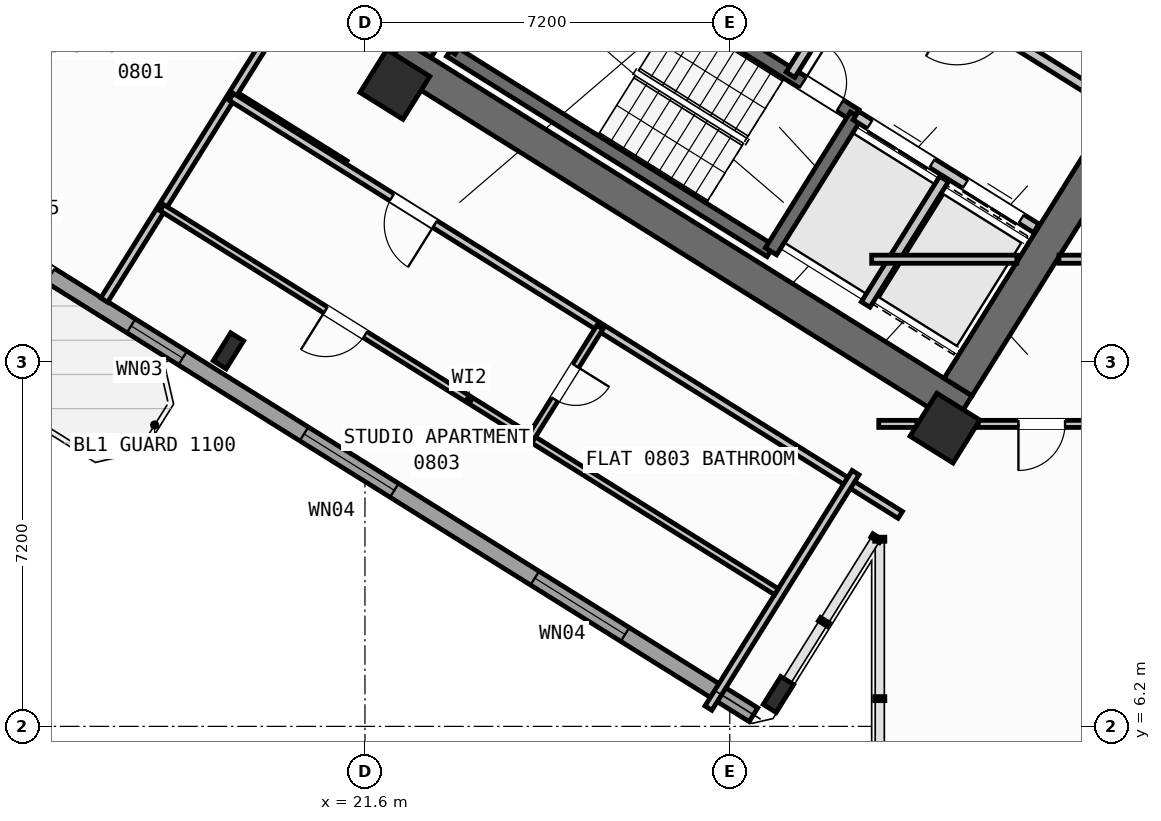
"""IFC4 building model, lengths in metres.
Left out: names, types, materials, properties, quantities, classifications, styles, units other than length and angle.
Written with IfcOpenShell. Run it as: python <this file> out.ifc"""

import sys

from ifc_helpers import new_model, si_unit, direction, frame, frame_2d, origin, origin_2d, place, context, subcontext, project, spatial, rectangle, hollow_rectangle, i_section, extrude, source, transform, mapped, element, fill, save


model = new_model("IFC4")
c1 = context("Model", 3, precision=1e-05, world=origin(), true_north=direction((0.0, 1.0)))
c2 = subcontext(c1, "Body", "Model", "MODEL_VIEW")
j1 = project(units=[si_unit("LENGTHUNIT", "METRE"), si_unit("PLANEANGLEUNIT", "RADIAN")], contexts=[c1])
p1 = place(None, origin())
s1 = spatial("IfcSite", under=j1, at=p1, CompositionType="ELEMENT")
p2 = place(p1, origin())
s2 = spatial("IfcBuilding", under=s1, at=p2, CompositionType="ELEMENT")
p3 = place(p2, frame((0.0, 0.0, 34.8)))
s3 = spatial("IfcBuildingStorey", under=s2, at=p3, CompositionType="ELEMENT", Elevation=34.8)
p4 = place(p3, frame((33.409, 12.45, 0.0), z_axis=(0.0, 0.0, 1.0), x_axis=(-0.848051132073, 0.529914405721, 0.0)))
e1 = element("IfcWall", 1, at=p4, inside=s3, PredefinedType="SHEAR", context=c2, shape_type="SweptSolid", body=[
    extrude(rectangle(XDim=13.24, YDim=0.65, at=frame_2d((6.62, 0.0))), origin(), (0.0, 0.0, 1.0), 3.35),
])
p5 = place(p3, frame((36.683, 18.304, 0.0), z_axis=(0.0, 0.0, 1.0), x_axis=(-0.529899109053, -0.848060690178, 0.0)))
e2 = element("IfcWall", 2, at=p5, inside=s3, PredefinedType="SHEAR", context=c2, shape_type="SweptSolid", body=[
    extrude(rectangle(XDim=6.375, YDim=0.65, at=frame_2d((3.188, 0.0))), origin(), (0.0, 0.0, 1.0), 3.35),
])
p6 = place(p3, frame((26.007, 24.976, 0.0), z_axis=(0.0, 0.0, 1.0), x_axis=(-0.529916319127, -0.848049936456, 0.0)))
e3 = element("IfcWall", 3, at=p6, inside=s3, PredefinedType="SHEAR", context=c2, shape_type="SweptSolid", body=[
    extrude(rectangle(XDim=6.375, YDim=0.65, at=frame_2d((3.188, 0.0))), origin(), (0.0, 0.0, 1.0), 3.35),
])
m1 = source(origin(), c2, "Body", "SweptSolid", [
    extrude(hollow_rectangle(XDim=1.0, YDim=1.0, WallThickness=0.04, at=origin_2d()), origin(), (0.0, 0.0, 1.0), 3.6),
])
p7 = place(p3, frame((33.046, 12.087, 0.0), z_axis=(0.0, 0.0, 1.0), x_axis=(-0.848048096156, 0.529919264233, 0.0)))
e4 = element("IfcColumn", 4, at=p7, inside=s3, PredefinedType="COLUMN", context=c2, shape_type="MappedRepresentation", body=[
    mapped(m1, transform((0.0, 0.0, 0.0), scale=1.0)),
])
m2 = source(origin(), c2, "Body", "SweptSolid", [
    extrude(i_section(OverallWidth=0.3, OverallDepth=0.65, WebThickness=0.016, FlangeThickness=0.031, at=origin_2d()), origin(), (0.0, 0.0, 1.0), 3.6),
])
p8 = place(p3, frame((29.761, 6.829, 0.0), z_axis=(0.0, 0.0, 1.0), x_axis=(-0.848048096156, 0.529919264233, 0.0)))
e5 = element("IfcColumn", 5, at=p8, inside=s3, PredefinedType="COLUMN", context=c2, shape_type="MappedRepresentation", body=[
    mapped(m2, transform((0.0, 0.0, 0.0), scale=1.0)),
])
p9 = place(p3, frame((22.191, 18.87, 0.0), z_axis=(0.0, 0.0, 1.0), x_axis=(-0.848048096156, 0.529919264233, 0.0)))
e6 = element("IfcColumn", 6, at=p9, inside=s3, PredefinedType="COLUMN", context=c2, shape_type="MappedRepresentation", body=[
    mapped(m1, transform((0.0, 0.0, 0.0), scale=1.0)),
])
p10 = place(p3, frame((18.906, 13.612, 0.0), z_axis=(0.0, 0.0, 1.0), x_axis=(-0.848048096156, 0.529919264233, 0.0)))
e7 = element("IfcColumn", 7, at=p10, inside=s3, PredefinedType="COLUMN", context=c2, shape_type="MappedRepresentation", body=[
    mapped(m2, transform((0.0, 0.0, 0.0), scale=1.0)),
])
p11 = place(p3, frame((29.268, 6.429, 0.0), z_axis=(0.0, 0.0, 1.0), x_axis=(-0.848049971435, 0.529916263149, 0.0)))
e8 = element("IfcWall", 8, at=p11, inside=s3, PredefinedType="STANDARD", context=c2, shape_type="SweptSolid", body=[
    extrude(rectangle(XDim=31.588, YDim=0.32, at=frame_2d((15.794, 0.0))), origin(), (0.0, 0.0, 1.0), 3.35),
])
p12 = place(p11, frame((16.362, 0.0, 0.0)))
e9 = element("IfcOpeningElement", 9, at=p12, cuts=e8, PredefinedType="OPENING", context=c2, shape_type="SweptSolid", body=[
    extrude(rectangle(XDim=1.2, YDim=2.15, at=frame_2d((0.6, 1.075))), frame((0.0, 0.17, 0.0), z_axis=(0.0, -1.0, 0.0), x_axis=(1.0, 0.0, 0.0)), (0.0, 0.0, 1.0), 0.34),
])
p13 = place(p11, frame((2.989, 0.0, 0.8)))
e10 = element("IfcOpeningElement", 10, at=p13, cuts=e8, PredefinedType="OPENING", context=c2, shape_type="SweptSolid", body=[
    extrude(rectangle(XDim=2.1, YDim=1.55, at=frame_2d((1.05, 0.775))), frame((0.0, 0.17, 0.0), z_axis=(0.0, -1.0, 0.0), x_axis=(1.0, 0.0, 0.0)), (0.0, 0.0, 1.0), 0.34),
])
p14 = place(p11, frame((8.359, 0.0, 0.8)))
e11 = element("IfcOpeningElement", 11, at=p14, cuts=e8, PredefinedType="OPENING", context=c2, shape_type="SweptSolid", body=[
    extrude(rectangle(XDim=2.1, YDim=1.55, at=frame_2d((1.05, 0.775))), frame((0.0, 0.17, 0.0), z_axis=(0.0, -1.0, 0.0), x_axis=(1.0, 0.0, 0.0)), (0.0, 0.0, 1.0), 0.34),
])
p15 = place(p11, frame((13.284, 0.0, 0.95)))
e12 = element("IfcOpeningElement", 12, at=p15, cuts=e8, PredefinedType="OPENING", context=c2, shape_type="SweptSolid", body=[
    extrude(rectangle(XDim=1.2, YDim=1.4, at=frame_2d((0.6, 0.7))), frame((0.0, 0.17, 0.0), z_axis=(0.0, -1.0, 0.0), x_axis=(1.0, 0.0, 0.0)), (0.0, 0.0, 1.0), 0.34),
])
p16 = place(p11, frame((20.39, 0.0, 0.95)))
e13 = element("IfcOpeningElement", 13, at=p16, cuts=e8, PredefinedType="OPENING", context=c2, shape_type="SweptSolid", body=[
    extrude(rectangle(XDim=1.2, YDim=1.4, at=frame_2d((0.6, 0.7))), frame((0.0, 0.17, 0.0), z_axis=(0.0, -1.0, 0.0), x_axis=(1.0, 0.0, 0.0)), (0.0, 0.0, 1.0), 0.34),
])
p17 = place(p11, frame((23.715, 0.0, 1.0)))
e14 = element("IfcOpeningElement", 14, at=p17, cuts=e8, PredefinedType="OPENING", context=c2, shape_type="SweptSolid", body=[
    extrude(rectangle(XDim=0.9, YDim=1.25, at=frame_2d((0.45, 0.625))), frame((0.0, 0.17, 0.0), z_axis=(0.0, -1.0, 0.0), x_axis=(1.0, 0.0, 0.0)), (0.0, 0.0, 1.0), 0.34),
])
p18 = place(p11, frame((27.481, 0.0, 0.8)))
e15 = element("IfcOpeningElement", 15, at=p18, cuts=e8, PredefinedType="OPENING", context=c2, shape_type="SweptSolid", body=[
    extrude(rectangle(XDim=2.1, YDim=1.55, at=frame_2d((1.05, 0.775))), frame((0.0, 0.17, 0.0), z_axis=(0.0, -1.0, 0.0), x_axis=(1.0, 0.0, 0.0)), (0.0, 0.0, 1.0), 0.34),
])
p19 = place(p3, frame((29.605, 15.581, 0.0), z_axis=(0.0, 0.0, 1.0), x_axis=(-0.848036911448, 0.529937163087, 0.0)))
e16 = element("IfcWall", 16, at=p19, inside=s3, PredefinedType="SHEAR", context=c2, shape_type="SweptSolid", body=[
    extrude(rectangle(XDim=7.46, YDim=0.26, at=frame_2d((3.73, 0.0))), origin(), (0.0, 0.0, 1.0), 3.35),
])
p20 = place(p3, frame((31.28, 18.261, 0.0), z_axis=(0.0, 0.0, 1.0), x_axis=(-0.848051618787, 0.529913626805, 0.0)))
e17 = element("IfcWall", 17, at=p20, inside=s3, PredefinedType="SHEAR", context=c2, shape_type="SweptSolid", body=[
    extrude(rectangle(XDim=7.46, YDim=0.26, at=frame_2d((3.73, 0.0))), origin(), (0.0, 0.0, 1.0), 3.35),
])
p21 = place(p20, frame((0.36, 0.0, 0.0)))
e18 = element("IfcOpeningElement", 18, at=p21, cuts=e17, PredefinedType="OPENING", context=c2, shape_type="SweptSolid", body=[
    extrude(rectangle(XDim=0.86, YDim=2.05, at=frame_2d((0.43, 1.025))), frame((0.0, 0.14, 0.0), z_axis=(0.0, -1.0, 0.0), x_axis=(1.0, 0.0, 0.0)), (0.0, 0.0, 1.0), 0.28),
])
p22 = place(p3, frame((31.288, 18.256, 0.0), z_axis=(0.0, 0.0, 1.0), x_axis=(-0.529943379326, -0.848033026897, 0.0)))
e19 = element("IfcWall", 19, at=p22, inside=s3, PredefinedType="SHEAR", context=c2, shape_type="SweptSolid", body=[
    extrude(rectangle(XDim=3.16, YDim=0.26, at=frame_2d((1.58, 0.0))), origin(), (0.0, 0.0, 1.0), 3.35),
])
p23 = place(p3, frame((24.945, 22.22, 0.0), z_axis=(0.0, 0.0, 1.0), x_axis=(-0.529908658664, -0.84805472316, 0.0)))
e20 = element("IfcWall", 20, at=p23, inside=s3, PredefinedType="SHEAR", context=c2, shape_type="SweptSolid", body=[
    extrude(rectangle(XDim=3.16, YDim=0.26, at=frame_2d((1.58, 0.0))), origin(), (0.0, 0.0, 1.0), 3.35),
])
p24 = place(p3, frame((34.848, 16.031, 0.0), z_axis=(0.0, 0.0, 1.0), x_axis=(-0.848044042236, 0.529925751807, 0.0)))
e21 = element("IfcWall", 21, at=p24, inside=s3, PredefinedType="STANDARD", context=c2, shape_type="SweptSolid", body=[
    extrude(rectangle(XDim=4.198, YDim=0.2, at=frame_2d((2.099, 0.0))), origin(), (0.0, 0.0, 1.0), 3.34),
])
p25 = place(p24, frame((0.348, 0.0, 0.0)))
e22 = element("IfcOpeningElement", 22, at=p25, cuts=e21, PredefinedType="OPENING", context=c2, shape_type="SweptSolid", body=[
    extrude(rectangle(XDim=1.3, YDim=2.2, at=frame_2d((0.65, 1.1))), frame((0.0, 0.11, 0.0), z_axis=(0.0, -1.0, 0.0), x_axis=(1.0, 0.0, 0.0)), (0.0, 0.0, 1.0), 0.22),
])
p26 = place(p24, frame((2.423, 0.0, 0.0)))
e23 = element("IfcOpeningElement", 23, at=p26, cuts=e21, PredefinedType="OPENING", context=c2, shape_type="SweptSolid", body=[
    extrude(rectangle(XDim=1.45, YDim=2.25, at=frame_2d((0.725, 1.125))), frame((0.0, 0.11, 0.0), z_axis=(0.0, -1.0, 0.0), x_axis=(1.0, 0.0, 0.0)), (0.0, 0.0, 1.0), 0.22),
])
p27 = place(p3, frame((36.374, 18.474, 0.0), z_axis=(0.0, 0.0, 1.0), x_axis=(-0.848051071577, 0.529914502535, 0.0)))
e24 = element("IfcWall", 24, at=p27, inside=s3, PredefinedType="STANDARD", context=c2, shape_type="SweptSolid", body=[
    extrude(rectangle(XDim=5.718, YDim=0.2, at=frame_2d((2.859, 0.0))), origin(), (0.0, 0.0, 1.0), 3.34),
])
p28 = place(p27, frame((2.498, 0.0, 0.0)))
e25 = element("IfcOpeningElement", 25, at=p28, cuts=e24, PredefinedType="OPENING", context=c2, shape_type="SweptSolid", body=[
    extrude(rectangle(XDim=1.15, YDim=2.1, at=frame_2d((0.575, 1.05))), frame((0.0, 0.11, 0.0), z_axis=(0.0, -1.0, 0.0), x_axis=(1.0, 0.0, 0.0)), (0.0, 0.0, 1.0), 0.22),
])
p29 = place(p3, frame((33.029, 17.003, 0.0), z_axis=(0.0, 0.0, 1.0), x_axis=(-0.529916267533, -0.848049968695, 0.0)))
e26 = element("IfcWall", 26, at=p29, inside=s3, PredefinedType="STANDARD", context=c2, shape_type="SweptSolid", body=[
    extrude(rectangle(XDim=2.92, YDim=0.2, at=frame_2d((1.46, 0.0))), origin(), (0.0, 0.0, 1.0), 3.34),
])
p30 = place(p3, frame((31.525, 21.504, 0.0), z_axis=(0.0, 0.0, 1.0), x_axis=(-0.529907497854, -0.848055448493, 0.0)))
e27 = element("IfcWall", 27, at=p30, inside=s3, PredefinedType="STANDARD", context=c2, shape_type="SweptSolid", body=[
    extrude(rectangle(XDim=2.88, YDim=0.2, at=frame_2d((1.44, 0.0))), origin(), (0.0, 0.0, 1.0), 3.34),
])
p31 = place(p3, frame((21.206, 17.292, 0.0), z_axis=(0.0, 0.0, 1.0), x_axis=(-0.848050851465, 0.529914854792, 0.0)))
e28 = element("IfcWall", 28, at=p31, inside=s3, PredefinedType="PARTITIONING", context=c2, shape_type="SweptSolid", body=[
    extrude(rectangle(XDim=2.61, YDim=0.16, at=frame_2d((1.305, 0.0))), origin(), (0.0, 0.0, 1.0), 3.34),
])
p32 = place(p3, frame((25.807, 29.582, 0.0), z_axis=(0.0, 0.0, 1.0), x_axis=(-0.529918119251, -0.84804881162, 0.0)))
e29 = element("IfcWall", 29, at=p32, inside=s3, PredefinedType="PARTITIONING", context=c2, shape_type="SweptSolid", body=[
    extrude(rectangle(XDim=17.65, YDim=0.16, at=frame_2d((8.825, 0.0))), origin(), (0.0, 0.0, 1.0), 3.34),
])
p33 = place(p3, frame((16.492, 21.827, 0.0), z_axis=(0.0, 0.0, 1.0), x_axis=(-0.529904608059, -0.848057254175, 0.0)))
e30 = element("IfcWall", 30, at=p33, inside=s3, PredefinedType="PARTITIONING", context=c2, shape_type="SweptSolid", body=[
    extrude(rectangle(XDim=5.351, YDim=0.16, at=frame_2d((2.675, 0.0))), origin(), (0.0, 0.0, 1.0), 2.725),
])
p34 = place(p3, frame((17.861, 31.505, 0.0), z_axis=(0.0, 0.0, 1.0), x_axis=(-0.529928839727, -0.848042112649, 0.0)))
e31 = element("IfcWall", 31, at=p34, inside=s3, PredefinedType="PARTITIONING", context=c2, shape_type="SweptSolid", body=[
    extrude(rectangle(XDim=15.34, YDim=0.11, at=frame_2d((7.67, 0.0))), origin(), (0.0, 0.0, 1.0), 3.34),
])
p35 = place(p34, frame((0.35, 0.0, 0.0)))
e32 = element("IfcOpeningElement", 32, at=p35, cuts=e31, PredefinedType="OPENING", context=c2, shape_type="SweptSolid", body=[
    extrude(rectangle(XDim=0.92, YDim=2.08, at=frame_2d((0.46, 1.04))), frame((0.0, 0.065, 0.0), z_axis=(0.0, -1.0, 0.0), x_axis=(1.0, 0.0, 0.0)), (0.0, 0.0, 1.0), 0.13),
])
p36 = place(p3, frame((32.164, 10.374, 0.0), z_axis=(0.0, 0.0, 1.0), x_axis=(-0.848044107957, 0.529925646633, 0.0)))
e33 = element("IfcWall", 33, at=p36, inside=s3, PredefinedType="PARTITIONING", context=c2, shape_type="SweptSolid", body=[
    extrude(rectangle(XDim=15.57, YDim=0.16, at=frame_2d((7.785, 0.0))), origin(), (0.0, 0.0, 1.0), 3.34),
])
p37 = place(p36, frame((10.83, 0.0, 0.0)))
e34 = element("IfcOpeningElement", 34, at=p37, cuts=e33, PredefinedType="OPENING", context=c2, shape_type="SweptSolid", body=[
    extrude(rectangle(XDim=1.0, YDim=2.1, at=frame_2d((0.5, 1.05))), frame((0.0, 0.09, 0.0), z_axis=(0.0, -1.0, 0.0), x_axis=(1.0, 0.0, 0.0)), (0.0, 0.0, 1.0), 0.18),
])
p38 = place(p3, frame((31.282, 11.208, 0.0), z_axis=(0.0, 0.0, 1.0), x_axis=(-0.529938869374, -0.84803584519, 0.0)))
e35 = element("IfcWall", 35, at=p38, inside=s3, PredefinedType="PARTITIONING", context=c2, shape_type="SweptSolid", body=[
    extrude(rectangle(XDim=5.48, YDim=0.16, at=frame_2d((2.74, 0.0))), origin(), (0.0, 0.0, 1.0), 3.34),
])
p39 = place(p3, frame((29.72, 8.859, 0.0), z_axis=(0.0, 0.0, 1.0), x_axis=(-0.848049134363, 0.529917602752, 0.0)))
e36 = element("IfcWall", 36, at=p39, inside=s3, PredefinedType="PLUMBINGWALL", context=c2, shape_type="SweptSolid", body=[
    extrude(rectangle(XDim=14.3, YDim=0.14, at=frame_2d((7.15, 0.0))), origin(), (0.0, 0.0, 1.0), 3.34),
])
p40 = place(p39, frame((9.57, 0.0, 0.0)))
e37 = element("IfcOpeningElement", 37, at=p40, cuts=e36, PredefinedType="OPENING", context=c2, shape_type="SweptSolid", body=[
    extrude(rectangle(XDim=0.92, YDim=2.08, at=frame_2d((0.46, 1.04))), frame((0.0, 0.08, 0.0), z_axis=(0.0, -1.0, 0.0), x_axis=(1.0, 0.0, 0.0)), (0.0, 0.0, 1.0), 0.16),
])
p41 = place(p3, frame((26.237, 14.078, 0.0), z_axis=(0.0, 0.0, 1.0), x_axis=(-0.52995640672, -0.848024885824, 0.0)))
e38 = element("IfcWall", 38, at=p41, inside=s3, PredefinedType="PLUMBINGWALL", context=c2, shape_type="SweptSolid", body=[
    extrude(rectangle(XDim=2.58, YDim=0.14, at=frame_2d((1.29, 0.0))), origin(), (0.0, 0.0, 1.0), 3.34),
])
p42 = place(p41, frame((0.9, 0.0, 0.0)))
e39 = element("IfcOpeningElement", 39, at=p42, cuts=e38, PredefinedType="OPENING", context=c2, shape_type="SweptSolid", body=[
    extrude(rectangle(XDim=0.78, YDim=2.05, at=frame_2d((0.39, 1.025))), frame((0.0, 0.08, 0.0), z_axis=(0.0, -1.0, 0.0), x_axis=(1.0, 0.0, 0.0)), (0.0, 0.0, 1.0), 0.16),
])
p43 = place(p3, frame((31.6, 15.42, 0.0), z_axis=(0.0, 0.0, 1.0), x_axis=(1.0, 0.0, 0.0)))
e40 = element("IfcWall", 40, at=p43, inside=s3, PredefinedType="PARTITIONING", context=c2, shape_type="SweptSolid", body=[
    extrude(rectangle(XDim=2.866, YDim=0.16, at=frame_2d((1.433, 0.0))), origin(), (0.0, 0.0, 1.0), 3.34),
])
p44 = place(p3, frame((35.296, 15.42, 0.0), z_axis=(0.0, 0.0, 1.0), x_axis=(1.0, 0.0, 0.0)))
e41 = element("IfcWall", 41, at=p44, inside=s3, PredefinedType="PARTITIONING", context=c2, shape_type="SweptSolid", body=[
    extrude(rectangle(XDim=15.311, YDim=0.16, at=frame_2d((7.655, 0.0))), origin(), (0.0, 0.0, 1.0), 3.34),
])
p45 = place(p44, frame((0.91, 0.0, 0.0)))
e42 = element("IfcOpeningElement", 42, at=p45, cuts=e41, PredefinedType="OPENING", context=c2, shape_type="SweptSolid", body=[
    extrude(rectangle(XDim=1.0, YDim=2.1, at=frame_2d((0.5, 1.05))), frame((0.0, 0.09, 0.0), z_axis=(0.0, -1.0, 0.0), x_axis=(1.0, 0.0, 0.0)), (0.0, 0.0, 1.0), 0.18),
])
p46 = place(p44, frame((8.74, 0.0, 0.0)))
e43 = element("IfcOpeningElement", 43, at=p46, cuts=e41, PredefinedType="OPENING", context=c2, shape_type="SweptSolid", body=[
    extrude(rectangle(XDim=1.0, YDim=2.1, at=frame_2d((0.5, 1.05))), frame((0.0, 0.09, 0.0), z_axis=(0.0, -1.0, 0.0), x_axis=(1.0, 0.0, 0.0)), (0.0, 0.0, 1.0), 0.18),
])
p47 = place(p3, frame((31.74, 12.17, 0.0), z_axis=(0.0, 0.0, 1.0), x_axis=(1.0, 0.0, 0.0)))
e44 = element("IfcWall", 44, at=p47, inside=s3, PredefinedType="PLUMBINGWALL", context=c2, shape_type="SweptSolid", body=[
    extrude(rectangle(XDim=0.754, YDim=0.14, at=frame_2d((0.377, 0.0))), origin(), (0.0, 0.0, 1.0), 3.34),
])
p48 = place(p3, frame((33.702, 12.17, 0.0), z_axis=(0.0, 0.0, 1.0), x_axis=(1.0, 0.0, 0.0)))
e45 = element("IfcWall", 45, at=p48, inside=s3, PredefinedType="PLUMBINGWALL", context=c2, shape_type="SweptSolid", body=[
    extrude(rectangle(XDim=4.111, YDim=0.14, at=frame_2d((2.056, 0.0))), origin(), (0.0, 0.0, 1.0), 2.525),
])
p49 = place(p48, frame((0.795, 0.0, 0.0)))
e46 = element("IfcOpeningElement", 46, at=p49, cuts=e45, PredefinedType="OPENING", context=c2, shape_type="SweptSolid", body=[
    extrude(rectangle(XDim=0.92, YDim=2.08, at=frame_2d((0.46, 1.04))), frame((0.0, 0.08, 0.0), z_axis=(0.0, -1.0, 0.0), x_axis=(1.0, 0.0, 0.0)), (0.0, 0.0, 1.0), 0.16),
])
m3 = source(origin(), c2, "Body", "SweptSolid", [
    extrude(rectangle(XDim=2.1, YDim=1.55, at=frame_2d((1.05, 0.775))), frame((0.0, 0.03, 0.0), z_axis=(0.0, -1.0, 0.0), x_axis=(1.0, 0.0, 0.0)), (0.0, 0.0, 1.0), 0.06),
])
p50 = place(p13, origin())
e47 = element("IfcWindow", 47, at=p50, inside=s3, PartitioningType="SINGLE_PANEL", PredefinedType="WINDOW", context=c2, shape_type="MappedRepresentation", body=[
    mapped(m3, transform((0.0, 0.0, 0.0), scale=1.0)),
])
fill(e10, e47)
p51 = place(p14, origin())
e48 = element("IfcWindow", 48, at=p51, inside=s3, PartitioningType="SINGLE_PANEL", PredefinedType="WINDOW", context=c2, shape_type="MappedRepresentation", body=[
    mapped(m3, transform((0.0, 0.0, 0.0), scale=1.0)),
])
fill(e11, e48)
m4 = source(origin(), c2, "Body", "SweptSolid", [
    extrude(rectangle(XDim=1.2, YDim=1.4, at=frame_2d((0.6, 0.7))), frame((0.0, 0.03, 0.0), z_axis=(0.0, -1.0, 0.0), x_axis=(1.0, 0.0, 0.0)), (0.0, 0.0, 1.0), 0.06),
])
p52 = place(p15, origin())
e49 = element("IfcWindow", 49, at=p52, inside=s3, PartitioningType="SINGLE_PANEL", PredefinedType="WINDOW", context=c2, shape_type="MappedRepresentation", body=[
    mapped(m4, transform((0.0, 0.0, 0.0), scale=1.0)),
])
fill(e12, e49)
m5 = source(origin(), c2, "Body", "SweptSolid", [
    extrude(rectangle(XDim=0.86, YDim=2.05, at=frame_2d((0.43, 1.025))), frame((0.0, 0.025, 0.0), z_axis=(0.0, -1.0, 0.0), x_axis=(1.0, 0.0, 0.0)), (0.0, 0.0, 1.0), 0.05),
])
p53 = place(p21, frame((0.86, 0.0, 0.0), z_axis=(0.0, 0.0, 1.0), x_axis=(-1.0, 0.0, 0.0)))
e50 = element("IfcDoor", 50, at=p53, inside=s3, OperationType="SINGLE_SWING_LEFT", PredefinedType="DOOR", context=c2, shape_type="MappedRepresentation", body=[
    mapped(m5, transform((0.0, 0.0, 0.0), scale=1.0)),
])
fill(e18, e50)
m6 = source(origin(), c2, "Body", "SweptSolid", [
    extrude(rectangle(XDim=1.3, YDim=2.2, at=frame_2d((0.65, 1.1))), frame((0.0, 0.025, 0.0), z_axis=(0.0, -1.0, 0.0), x_axis=(1.0, 0.0, 0.0)), (0.0, 0.0, 1.0), 0.05),
])
p54 = place(p25, origin())
e51 = element("IfcDoor", 51, at=p54, inside=s3, OperationType="DOUBLE_DOOR_SLIDING", PredefinedType="DOOR", context=c2, shape_type="MappedRepresentation", body=[
    mapped(m6, transform((0.0, 0.0, 0.0), scale=1.0)),
])
fill(e22, e51)
m7 = source(origin(), c2, "Body", "SweptSolid", [
    extrude(rectangle(XDim=1.45, YDim=2.25, at=frame_2d((0.725, 1.125))), frame((0.0, 0.025, 0.0), z_axis=(0.0, -1.0, 0.0), x_axis=(1.0, 0.0, 0.0)), (0.0, 0.0, 1.0), 0.05),
])
p55 = place(p26, origin())
e52 = element("IfcDoor", 52, at=p55, inside=s3, OperationType="DOUBLE_DOOR_SLIDING", PredefinedType="DOOR", context=c2, shape_type="MappedRepresentation", body=[
    mapped(m7, transform((0.0, 0.0, 0.0), scale=1.0)),
])
fill(e23, e52)
m8 = source(origin(), c2, "Body", "SweptSolid", [
    extrude(rectangle(XDim=1.0, YDim=2.1, at=frame_2d((0.5, 1.05))), frame((0.0, 0.025, 0.0), z_axis=(0.0, -1.0, 0.0), x_axis=(1.0, 0.0, 0.0)), (0.0, 0.0, 1.0), 0.05),
])
p56 = place(p37, origin())
e53 = element("IfcDoor", 53, at=p56, inside=s3, OperationType="SINGLE_SWING_LEFT", PredefinedType="DOOR", context=c2, shape_type="MappedRepresentation", body=[
    mapped(m8, transform((0.0, 0.0, 0.0), scale=1.0)),
])
fill(e34, e53)
m9 = source(origin(), c2, "Body", "SweptSolid", [
    extrude(rectangle(XDim=0.92, YDim=2.08, at=frame_2d((0.46, 1.04))), frame((0.0, 0.025, 0.0), z_axis=(0.0, -1.0, 0.0), x_axis=(1.0, 0.0, 0.0)), (0.0, 0.0, 1.0), 0.05),
])
p57 = place(p40, origin())
e54 = element("IfcDoor", 54, at=p57, inside=s3, OperationType="SINGLE_SWING_RIGHT", PredefinedType="DOOR", context=c2, shape_type="MappedRepresentation", body=[
    mapped(m9, transform((0.0, 0.0, 0.0), scale=1.0)),
])
fill(e37, e54)
m10 = source(origin(), c2, "Body", "SweptSolid", [
    extrude(rectangle(XDim=0.78, YDim=2.05, at=frame_2d((0.39, 1.025))), frame((0.0, 0.025, 0.0), z_axis=(0.0, -1.0, 0.0), x_axis=(1.0, 0.0, 0.0)), (0.0, 0.0, 1.0), 0.05),
])
p58 = place(p42, origin())
e55 = element("IfcDoor", 55, at=p58, inside=s3, OperationType="SINGLE_SWING_LEFT", PredefinedType="DOOR", context=c2, shape_type="MappedRepresentation", body=[
    mapped(m10, transform((0.0, 0.0, 0.0), scale=1.0)),
])
fill(e39, e55)
p59 = place(p49, frame((0.92, 0.0, 0.0), z_axis=(0.0, 0.0, 1.0), x_axis=(-1.0, 0.0, 0.0)))
e56 = element("IfcDoor", 56, at=p59, inside=s3, OperationType="SINGLE_SWING_RIGHT", PredefinedType="DOOR", context=c2, shape_type="MappedRepresentation", body=[
    mapped(m9, transform((0.0, 0.0, 0.0), scale=1.0)),
])
fill(e46, e56)
save(model, sys.argv[1])
